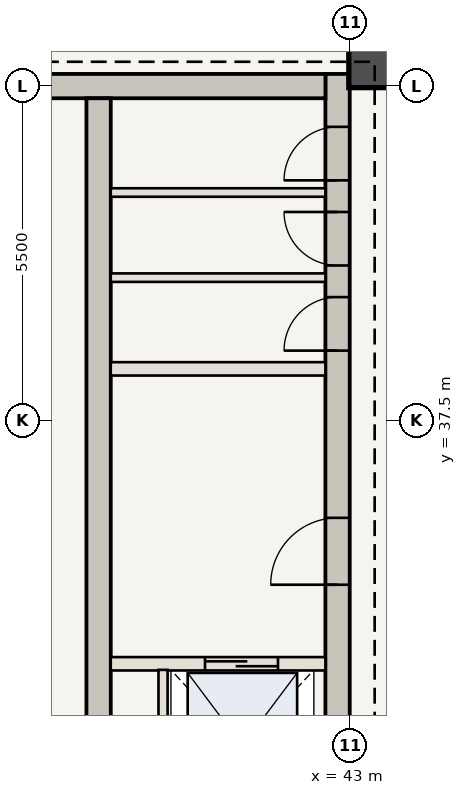
"""IFC4 building model, lengths in metres.
Left out: names, types, materials, properties, quantities, classifications, styles, units other than length and angle.
Written with IfcOpenShell. Run it as: python <this file> out.ifc"""

import sys

from ifc_helpers import new_model, si_unit, direction, frame, frame_2d, origin, origin_2d, place, context, subcontext, project, spatial, rectangle, extrude, element, fill, save


model = new_model("IFC4")
c1 = context("Model", 3, precision=1e-05, world=origin(), true_north=direction((0.0, 1.0)))
c2 = subcontext(c1, "Body", "Model", "MODEL_VIEW")
j1 = project(units=[si_unit("LENGTHUNIT", "METRE"), si_unit("PLANEANGLEUNIT", "RADIAN")], contexts=[c1])
p1 = place(None, origin())
s1 = spatial("IfcSite", under=j1, at=p1, CompositionType="ELEMENT")
p2 = place(p1, origin())
s2 = spatial("IfcBuilding", under=s1, at=p2, CompositionType="ELEMENT")
p3 = place(p2, frame((0.0, 0.0, 304.5)))
s3 = spatial("IfcBuildingStorey", under=s2, at=p3, CompositionType="ELEMENT", Elevation=304.5)
p4 = place(p3, frame((42.79, 30.6, 0.0), z_axis=(0.0, 0.0, 1.0), x_axis=(0.0, 1.0, 0.0)))
e1 = element("IfcWall", 1, at=p4, inside=s3, PredefinedType="SHEAR", context=c2, shape_type="SweptSolid", body=[
    extrude(rectangle(XDim=12.6, YDim=0.4, at=frame_2d((6.3, 0.0))), origin(), (0.0, 0.0, 1.0), 3.85),
])
p5 = place(p4, frame((4.2, 0.0, 0.0)))
e2 = element("IfcOpeningElement", 2, at=p5, cuts=e1, PredefinedType="OPENING", context=c2, shape_type="SweptSolid", body=[
    extrude(rectangle(XDim=1.1, YDim=2.15, at=frame_2d((0.55, 1.075))), frame((0.0, 0.21, 0.0), z_axis=(0.0, -1.0, 0.0), x_axis=(1.0, 0.0, 0.0)), (0.0, 0.0, 1.0), 0.42),
])
p6 = place(p4, frame((8.05, 0.0, 0.0)))
e3 = element("IfcOpeningElement", 3, at=p6, cuts=e1, PredefinedType="OPENING", context=c2, shape_type="SweptSolid", body=[
    extrude(rectangle(XDim=0.88, YDim=2.1, at=frame_2d((0.44, 1.05))), frame((0.0, 0.21, 0.0), z_axis=(0.0, -1.0, 0.0), x_axis=(1.0, 0.0, 0.0)), (0.0, 0.0, 1.0), 0.42),
])
p7 = place(p4, frame((9.45, 0.0, 0.0)))
e4 = element("IfcOpeningElement", 4, at=p7, cuts=e1, PredefinedType="OPENING", context=c2, shape_type="SweptSolid", body=[
    extrude(rectangle(XDim=0.88, YDim=2.1, at=frame_2d((0.44, 1.05))), frame((0.0, 0.21, 0.0), z_axis=(0.0, -1.0, 0.0), x_axis=(1.0, 0.0, 0.0)), (0.0, 0.0, 1.0), 0.42),
])
p8 = place(p4, frame((10.85, 0.0, 0.0)))
e5 = element("IfcOpeningElement", 5, at=p8, cuts=e1, PredefinedType="OPENING", context=c2, shape_type="SweptSolid", body=[
    extrude(rectangle(XDim=0.88, YDim=2.1, at=frame_2d((0.44, 1.05))), frame((0.0, 0.21, 0.0), z_axis=(0.0, -1.0, 0.0), x_axis=(1.0, 0.0, 0.0)), (0.0, 0.0, 1.0), 0.42),
])
p9 = place(p3, frame((37.75, 43.0, 0.0), z_axis=(0.0, 0.0, 1.0), x_axis=(1.0, 0.0, 0.0)))
e6 = element("IfcWall", 6, at=p9, inside=s3, PredefinedType="SHEAR", context=c2, shape_type="SweptSolid", body=[
    extrude(rectangle(XDim=4.84, YDim=0.4, at=frame_2d((2.42, 0.0))), origin(), (0.0, 0.0, 1.0), 3.85),
])
p10 = place(p3, frame((38.86, 30.6, 0.0), z_axis=(0.0, 0.0, 1.0), x_axis=(0.0, 1.0, 0.0)))
e7 = element("IfcWall", 7, at=p10, inside=s3, PredefinedType="SHEAR", context=c2, shape_type="SweptSolid", body=[
    extrude(rectangle(XDim=12.2, YDim=0.4, at=frame_2d((6.1, 0.0))), origin(), (0.0, 0.0, 1.0), 3.85),
])
p11 = place(p3, frame((43.35, 43.35, 0.0), z_axis=(0.0, 0.0, 1.0), x_axis=(1.0, 0.0, 0.0)))
e8 = element("IfcColumn", 8, at=p11, inside=s3, PredefinedType="COLUMN", context=c2, shape_type="SweptSolid", body=[
    extrude(rectangle(XDim=0.75, YDim=0.75, at=origin_2d()), origin(), (0.0, 0.0, 1.0), 3.85),
])
p12 = place(p3, frame((39.06, 33.5, 0.0), z_axis=(0.0, 0.0, 1.0), x_axis=(1.0, 0.0, 0.0)))
e9 = element("IfcWall", 9, at=p12, inside=s3, PredefinedType="STANDARD", context=c2, shape_type="SweptSolid", body=[
    extrude(rectangle(XDim=3.53, YDim=0.22, at=frame_2d((1.765, 0.0))), origin(), (0.0, 0.0, 1.0), 3.63),
])
p13 = place(p12, frame((1.55, 0.0, 0.0)))
e10 = element("IfcOpeningElement", 10, at=p13, cuts=e9, PredefinedType="OPENING", context=c2, shape_type="SweptSolid", body=[
    extrude(rectangle(XDim=1.2, YDim=2.2, at=frame_2d((0.6, 1.1))), frame((0.0, 0.12, 0.0), z_axis=(0.0, -1.0, 0.0), x_axis=(1.0, 0.0, 0.0)), (0.0, 0.0, 1.0), 0.24),
])
p14 = place(p3, frame((39.92, 30.75, 0.0), z_axis=(0.0, 0.0, 1.0), x_axis=(0.0, 1.0, 0.0)))
e11 = element("IfcWall", 11, at=p14, inside=s3, PredefinedType="STANDARD", context=c2, shape_type="SweptSolid", body=[
    extrude(rectangle(XDim=2.65, YDim=0.15, at=frame_2d((1.325, 0.0))), origin(), (0.0, 0.0, 1.0), 3.63),
])
p15 = place(p3, frame((39.06, 38.35, 0.0), z_axis=(0.0, 0.0, 1.0), x_axis=(1.0, 0.0, 0.0)))
e12 = element("IfcWall", 12, at=p15, inside=s3, PredefinedType="STANDARD", context=c2, shape_type="SweptSolid", body=[
    extrude(rectangle(XDim=3.53, YDim=0.22, at=frame_2d((1.765, 0.0))), origin(), (0.0, 0.0, 1.0), 3.63),
])
for number, where, z_axis, x_axis in (
    (13, (39.06, 39.85, 0.0), (0.0, 0.0, 1.0), (1.0, 0.0, 0.0)),
    (14, (39.06, 41.25, 0.0), (0.0, 0.0, 1.0), (1.0, 0.0, 0.0)),
):
    element("IfcWall", number, at=place(p3, frame(where, z_axis=z_axis, x_axis=x_axis)), inside=s3, PredefinedType="STANDARD", context=c2, shape_type="SweptSolid", body=[
        extrude(rectangle(XDim=3.53, YDim=0.14, at=frame_2d((1.765, 0.0))), origin(), (0.0, 0.0, 1.0), 3.63),
    ])
p16 = place(p5, origin())
e15 = element("IfcDoor", 15, at=p16, inside=s3, OperationType="SINGLE_SWING_LEFT", PredefinedType="DOOR", context=c2, shape_type="SweptSolid", body=[
    extrude(rectangle(XDim=1.1, YDim=2.15, at=frame_2d((0.55, 1.075))), frame((0.0, 0.025, 0.0), z_axis=(0.0, -1.0, 0.0), x_axis=(1.0, 0.0, 0.0)), (0.0, 0.0, 1.0), 0.05),
])
fill(e2, e15)
p17 = place(p6, origin())
e16 = element("IfcDoor", 16, at=p17, inside=s3, OperationType="SINGLE_SWING_LEFT", PredefinedType="DOOR", context=c2, shape_type="SweptSolid", body=[
    extrude(rectangle(XDim=0.88, YDim=2.1, at=frame_2d((0.44, 1.05))), frame((0.0, 0.025, 0.0), z_axis=(0.0, -1.0, 0.0), x_axis=(1.0, 0.0, 0.0)), (0.0, 0.0, 1.0), 0.05),
])
fill(e3, e16)
p18 = place(p7, origin())
e17 = element("IfcDoor", 17, at=p18, inside=s3, OperationType="SINGLE_SWING_RIGHT", PredefinedType="DOOR", context=c2, shape_type="SweptSolid", body=[
    extrude(rectangle(XDim=0.88, YDim=2.1, at=frame_2d((0.44, 1.05))), frame((0.0, 0.025, 0.0), z_axis=(0.0, -1.0, 0.0), x_axis=(1.0, 0.0, 0.0)), (0.0, 0.0, 1.0), 0.05),
])
fill(e4, e17)
p19 = place(p8, origin())
e18 = element("IfcDoor", 18, at=p19, inside=s3, OperationType="SINGLE_SWING_LEFT", PredefinedType="DOOR", context=c2, shape_type="SweptSolid", body=[
    extrude(rectangle(XDim=0.88, YDim=2.1, at=frame_2d((0.44, 1.05))), frame((0.0, 0.025, 0.0), z_axis=(0.0, -1.0, 0.0), x_axis=(1.0, 0.0, 0.0)), (0.0, 0.0, 1.0), 0.05),
])
fill(e5, e18)
p20 = place(p13, origin())
e19 = element("IfcDoor", 19, at=p20, inside=s3, OperationType="DOUBLE_DOOR_SLIDING", PredefinedType="DOOR", context=c2, shape_type="SweptSolid", body=[
    extrude(rectangle(XDim=1.2, YDim=2.2, at=frame_2d((0.6, 1.1))), frame((0.0, 0.025, 0.0), z_axis=(0.0, -1.0, 0.0), x_axis=(1.0, 0.0, 0.0)), (0.0, 0.0, 1.0), 0.05),
])
fill(e10, e19)
save(model, sys.argv[1])
